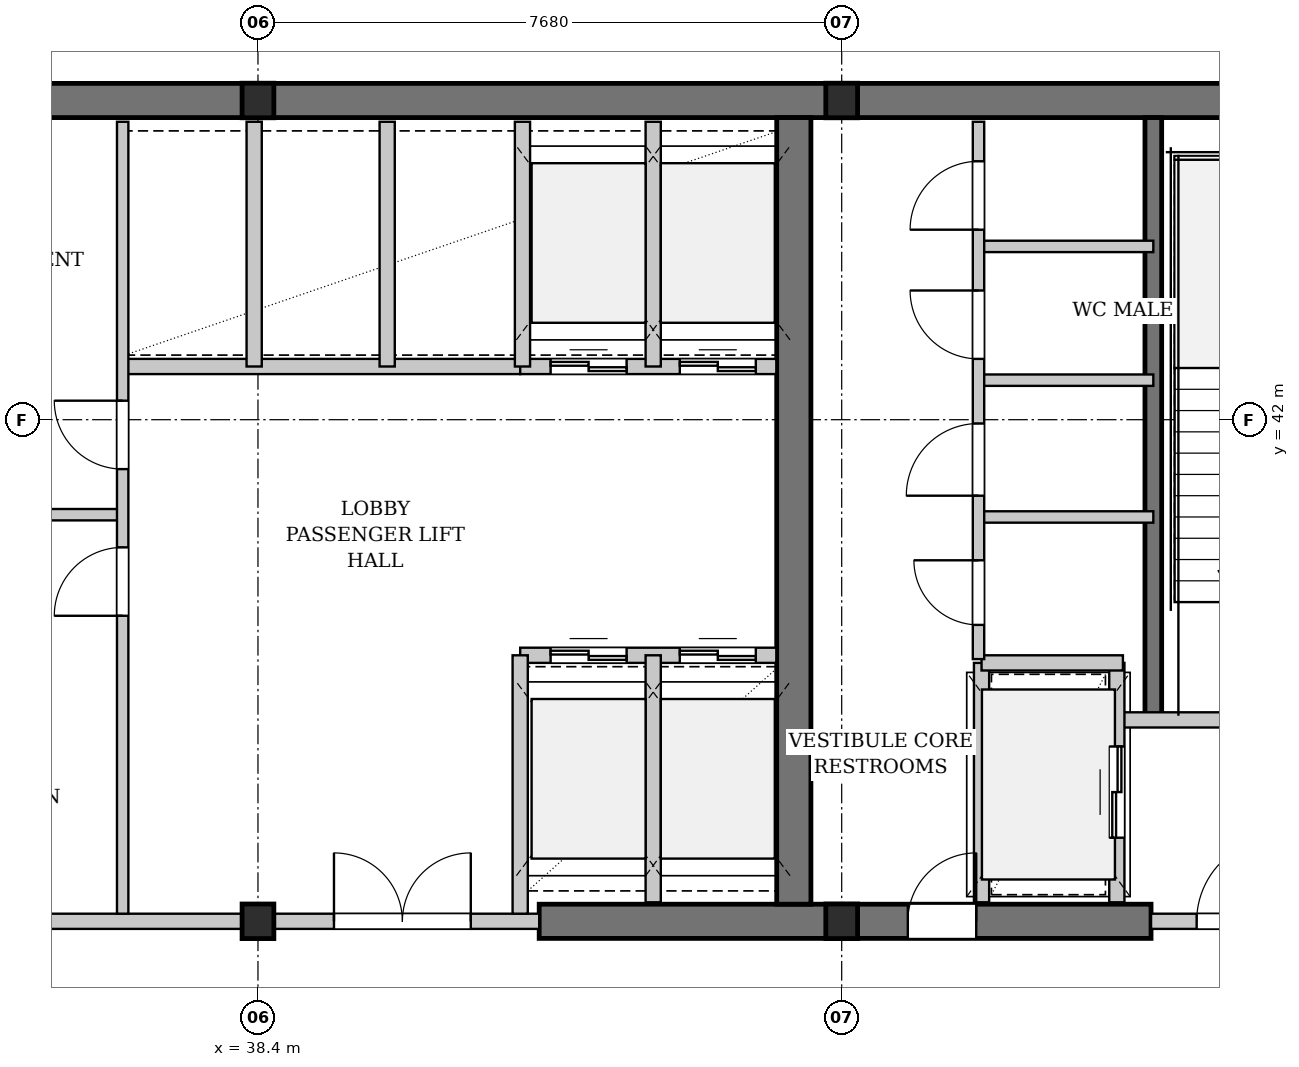
"""IFC4 building model, lengths in metres.
Left out: names, types, materials, properties, quantities, classifications, styles, units other than length and angle.
Written with IfcOpenShell. Run it as: python <this file> out.ifc"""

import sys

from ifc_helpers import new_model, si_unit, direction, frame, frame_2d, origin, origin_2d, place, context, subcontext, project, spatial, rectangle, i_section, extrude, element, fill, save


model = new_model("IFC4")
c1 = context("Model", 3, precision=1e-05, world=origin(), true_north=direction((0.0, 1.0)))
c2 = subcontext(c1, "Body", "Model", "MODEL_VIEW")
j1 = project(units=[si_unit("LENGTHUNIT", "METRE"), si_unit("PLANEANGLEUNIT", "RADIAN")], contexts=[c1])
p1 = place(None, origin())
s1 = spatial("IfcSite", under=j1, at=p1, CompositionType="ELEMENT")
p2 = place(p1, origin())
s2 = spatial("IfcBuilding", under=s1, at=p2, CompositionType="ELEMENT")
p3 = place(p2, frame((0.0, 0.0, 196.1)))
s3 = spatial("IfcBuildingStorey", under=s2, at=p3, CompositionType="ELEMENT", Elevation=196.1)
p4 = place(p3, frame((22.815, 46.2, 0.0), z_axis=(0.0, 0.0, 1.0), x_axis=(1.0, 0.0, 0.0)))
e1 = element("IfcWall", 1, at=p4, inside=s3, PredefinedType="SHEAR", context=c2, shape_type="SweptSolid", body=[
    extrude(rectangle(XDim=31.17, YDim=0.45, at=frame_2d((15.585, 0.0))), origin(), (0.0, 0.0, 1.0), 3.78),
])
p5 = place(p3, frame((42.1, 35.4, 0.0), z_axis=(0.0, 0.0, 1.0), x_axis=(1.0, 0.0, 0.0)))
e2 = element("IfcWall", 2, at=p5, inside=s3, PredefinedType="SHEAR", context=c2, shape_type="SweptSolid", body=[
    extrude(rectangle(XDim=8.05, YDim=0.45, at=frame_2d((4.025, 0.0))), origin(), (0.0, 0.0, 1.0), 3.78),
])
p6 = place(p5, frame((4.85, 0.0, 0.0)))
e3 = element("IfcOpeningElement", 3, at=p6, cuts=e2, PredefinedType="OPENING", context=c2, shape_type="SweptSolid", body=[
    extrude(rectangle(XDim=0.9, YDim=2.15, at=frame_2d((0.45, 1.075))), frame((0.0, 0.235, 0.0), z_axis=(0.0, -1.0, 0.0), x_axis=(1.0, 0.0, 0.0)), (0.0, 0.0, 1.0), 0.47),
])
p7 = place(p3, frame((45.45, 35.625, 0.0), z_axis=(0.0, 0.0, 1.0), x_axis=(0.0, 1.0, 0.0)))
e4 = element("IfcWall", 4, at=p7, inside=s3, PredefinedType="SHEAR", context=c2, shape_type="SweptSolid", body=[
    extrude(rectangle(XDim=10.35, YDim=0.45, at=frame_2d((5.175, 0.0))), origin(), (0.0, 0.0, 1.0), 3.78),
])
p8 = place(p3, frame((50.18, 38.05, 0.0), z_axis=(0.0, 0.0, 1.0), x_axis=(0.0, 1.0, 0.0)))
e5 = element("IfcWall", 5, at=p8, inside=s3, PredefinedType="SHEAR", context=c2, shape_type="SweptSolid", body=[
    extrude(rectangle(XDim=7.925, YDim=0.22, at=frame_2d((3.962, 0.0))), origin(), (0.0, 0.0, 1.0), 3.78),
])
for number, where, z_axis, x_axis in (
    (6, (38.4, 35.4, 0.0), (0.0, 0.0, 1.0), (1.0, 0.0, 0.0)),
    (7, (38.4, 46.2, 0.0), (0.0, 0.0, 1.0), (1.0, 0.0, 0.0)),
    (8, (46.08, 35.4, 0.0), (0.0, 0.0, 1.0), (1.0, 0.0, 0.0)),
    (9, (46.08, 46.2, 0.0), (0.0, 0.0, 1.0), (1.0, 0.0, 0.0)),
):
    element("IfcColumn", number, at=place(p3, frame(where, z_axis=z_axis, x_axis=x_axis)), inside=s3, PredefinedType="COLUMN", context=c2, shape_type="SweptSolid", body=[
        extrude(i_section(OverallWidth=0.418, OverallDepth=0.455, WebThickness=0.042, FlangeThickness=0.068, FilletRadius=0.015, at=origin_2d()), origin(), (0.0, 0.0, 1.0), 4.2),
    ])
p9 = place(p3, frame((35.6, 35.4, 0.0), z_axis=(0.0, 0.0, 1.0), x_axis=(1.0, 0.0, 0.0)))
e10 = element("IfcWall", 10, at=p9, inside=s3, PredefinedType="PARTITIONING", context=c2, shape_type="SweptSolid", body=[
    extrude(rectangle(XDim=6.5, YDim=0.2, at=frame_2d((3.25, 0.0))), origin(), (0.0, 0.0, 1.0), 2.961),
])
p10 = place(p9, frame((3.8, 0.0, 0.0)))
e11 = element("IfcOpeningElement", 11, at=p10, cuts=e10, PredefinedType="OPENING", context=c2, shape_type="SweptSolid", body=[
    extrude(rectangle(XDim=1.8, YDim=2.3, at=frame_2d((0.9, 1.15))), frame((0.0, 0.11, 0.0), z_axis=(0.0, -1.0, 0.0), x_axis=(1.0, 0.0, 0.0)), (0.0, 0.0, 1.0), 0.22),
])
p11 = place(p3, frame((36.6, 42.7, 0.0), z_axis=(0.0, 0.0, 1.0), x_axis=(1.0, 0.0, 0.0)))
e12 = element("IfcWall", 12, at=p11, inside=s3, PredefinedType="PARTITIONING", context=c2, shape_type="SweptSolid", body=[
    extrude(rectangle(XDim=5.25, YDim=0.2, at=frame_2d((2.625, 0.0))), origin(), (0.0, 0.0, 1.0), 3.78),
])
p12 = place(p3, frame((38.35, 42.7, 0.0), z_axis=(0.0, 0.0, 1.0), x_axis=(0.0, 1.0, 0.0)))
e13 = element("IfcWall", 13, at=p12, inside=s3, PredefinedType="PARTITIONING", context=c2, shape_type="SweptSolid", body=[
    extrude(rectangle(XDim=3.22, YDim=0.2, at=frame_2d((1.61, 0.0))), origin(), (0.0, 0.0, 1.0), 2.961),
])
p13 = place(p3, frame((40.1, 42.7, 0.0), z_axis=(0.0, 0.0, 1.0), x_axis=(0.0, 1.0, 0.0)))
e14 = element("IfcWall", 14, at=p13, inside=s3, PredefinedType="PARTITIONING", context=c2, shape_type="SweptSolid", body=[
    extrude(rectangle(XDim=3.22, YDim=0.2, at=frame_2d((1.61, 0.0))), origin(), (0.0, 0.0, 1.0), 3.78),
])
p14 = place(p3, frame((33.05, 40.75, 0.0), z_axis=(0.0, 0.0, 1.0), x_axis=(1.0, 0.0, 0.0)))
e15 = element("IfcWall", 15, at=p14, inside=s3, PredefinedType="PARTITIONING", context=c2, shape_type="SweptSolid", body=[
    extrude(rectangle(XDim=3.57, YDim=0.15, at=frame_2d((1.785, 0.0))), origin(), (0.0, 0.0, 1.0), 3.78),
])
p15 = place(p3, frame((36.62, 35.5, 0.0), z_axis=(0.0, 0.0, 1.0), x_axis=(0.0, 1.0, 0.0)))
e16 = element("IfcWall", 16, at=p15, inside=s3, PredefinedType="PARTITIONING", context=c2, shape_type="SweptSolid", body=[
    extrude(rectangle(XDim=10.42, YDim=0.15, at=frame_2d((5.21, 0.0))), origin(), (0.0, 0.0, 1.0), 3.78),
])
p16 = place(p15, frame((3.92, 0.0, 0.0)))
e17 = element("IfcOpeningElement", 17, at=p16, cuts=e16, PredefinedType="OPENING", context=c2, shape_type="SweptSolid", body=[
    extrude(rectangle(XDim=0.9, YDim=2.15, at=frame_2d((0.45, 1.075))), frame((0.0, 0.085, 0.0), z_axis=(0.0, -1.0, 0.0), x_axis=(1.0, 0.0, 0.0)), (0.0, 0.0, 1.0), 0.17),
])
p17 = place(p15, frame((5.85, 0.0, 0.0)))
e18 = element("IfcOpeningElement", 18, at=p17, cuts=e16, PredefinedType="OPENING", context=c2, shape_type="SweptSolid", body=[
    extrude(rectangle(XDim=0.9, YDim=2.15, at=frame_2d((0.45, 1.075))), frame((0.0, 0.085, 0.0), z_axis=(0.0, -1.0, 0.0), x_axis=(1.0, 0.0, 0.0)), (0.0, 0.0, 1.0), 0.17),
])
p18 = place(p3, frame((41.85, 38.9, 0.0), z_axis=(0.0, 0.0, 1.0), x_axis=(1.0, 0.0, 0.0)))
e19 = element("IfcWall", 19, at=p18, inside=s3, PredefinedType="PARTITIONING", context=c2, shape_type="SweptSolid", body=[
    extrude(rectangle(XDim=3.37, YDim=0.2, at=frame_2d((1.685, 0.0))), origin(), (0.0, 0.0, 1.0), 3.78),
])
p19 = place(p18, frame((0.4, 0.0, 0.0)))
e20 = element("IfcOpeningElement", 20, at=p19, cuts=e19, PredefinedType="OPENING", context=c2, shape_type="SweptSolid", body=[
    extrude(rectangle(XDim=1.0, YDim=2.2, at=frame_2d((0.5, 1.1))), frame((0.0, 0.11, 0.0), z_axis=(0.0, -1.0, 0.0), x_axis=(1.0, 0.0, 0.0)), (0.0, 0.0, 1.0), 0.22),
])
p20 = place(p18, frame((2.1, 0.0, 0.0)))
e21 = element("IfcOpeningElement", 21, at=p20, cuts=e19, PredefinedType="OPENING", context=c2, shape_type="SweptSolid", body=[
    extrude(rectangle(XDim=1.0, YDim=2.2, at=frame_2d((0.5, 1.1))), frame((0.0, 0.11, 0.0), z_axis=(0.0, -1.0, 0.0), x_axis=(1.0, 0.0, 0.0)), (0.0, 0.0, 1.0), 0.22),
])
p21 = place(p3, frame((41.85, 42.7, 0.0), z_axis=(0.0, 0.0, 1.0), x_axis=(1.0, 0.0, 0.0)))
e22 = element("IfcWall", 22, at=p21, inside=s3, PredefinedType="PARTITIONING", context=c2, shape_type="SweptSolid", body=[
    extrude(rectangle(XDim=3.37, YDim=0.2, at=frame_2d((1.685, 0.0))), origin(), (0.0, 0.0, 1.0), 3.78),
])
p22 = place(p21, frame((0.4, 0.0, 0.0)))
e23 = element("IfcOpeningElement", 23, at=p22, cuts=e22, PredefinedType="OPENING", context=c2, shape_type="SweptSolid", body=[
    extrude(rectangle(XDim=1.0, YDim=2.2, at=frame_2d((0.5, 1.1))), frame((0.0, 0.11, 0.0), z_axis=(0.0, -1.0, 0.0), x_axis=(1.0, 0.0, 0.0)), (0.0, 0.0, 1.0), 0.22),
])
p23 = place(p21, frame((2.1, 0.0, 0.0)))
e24 = element("IfcOpeningElement", 24, at=p23, cuts=e22, PredefinedType="OPENING", context=c2, shape_type="SweptSolid", body=[
    extrude(rectangle(XDim=1.0, YDim=2.2, at=frame_2d((0.5, 1.1))), frame((0.0, 0.11, 0.0), z_axis=(0.0, -1.0, 0.0), x_axis=(1.0, 0.0, 0.0)), (0.0, 0.0, 1.0), 0.22),
])
p24 = place(p3, frame((43.6, 35.65, 0.0), z_axis=(0.0, 0.0, 1.0), x_axis=(0.0, 1.0, 0.0)))
e25 = element("IfcWall", 25, at=p24, inside=s3, PredefinedType="PARTITIONING", context=c2, shape_type="SweptSolid", body=[
    extrude(rectangle(XDim=3.25, YDim=0.2, at=frame_2d((1.625, 0.0))), origin(), (0.0, 0.0, 1.0), 3.78),
])
p25 = place(p3, frame((43.6, 42.7, 0.0), z_axis=(0.0, 0.0, 1.0), x_axis=(0.0, 1.0, 0.0)))
e26 = element("IfcWall", 26, at=p25, inside=s3, PredefinedType="PARTITIONING", context=c2, shape_type="SweptSolid", body=[
    extrude(rectangle(XDim=3.22, YDim=0.2, at=frame_2d((1.61, 0.0))), origin(), (0.0, 0.0, 1.0), 3.78),
])
p26 = place(p3, frame((41.85, 35.5, 0.0), z_axis=(0.0, 0.0, 1.0), x_axis=(0.0, 1.0, 0.0)))
e27 = element("IfcWall", 27, at=p26, inside=s3, PredefinedType="PARTITIONING", context=c2, shape_type="SweptSolid", body=[
    extrude(rectangle(XDim=3.4, YDim=0.2, at=frame_2d((1.7, 0.0))), origin(), (0.0, 0.0, 1.0), 3.78),
])
p27 = place(p3, frame((41.88, 42.7, 0.0), z_axis=(0.0, 0.0, 1.0), x_axis=(0.0, 1.0, 0.0)))
e28 = element("IfcWall", 28, at=p27, inside=s3, PredefinedType="PARTITIONING", context=c2, shape_type="SweptSolid", body=[
    extrude(rectangle(XDim=3.22, YDim=0.2, at=frame_2d((1.61, 0.0))), origin(), (0.0, 0.0, 1.0), 3.78),
])
p28 = place(p3, frame((49.78, 38.05, 0.0), z_axis=(0.0, 0.0, 1.0), x_axis=(1.0, 0.0, 0.0)))
e29 = element("IfcWall", 29, at=p28, inside=s3, PredefinedType="PARTITIONING", context=c2, shape_type="SweptSolid", body=[
    extrude(rectangle(XDim=3.72, YDim=0.2, at=frame_2d((1.86, 0.0))), origin(), (0.0, 0.0, 1.0), 3.78),
])
p29 = place(p28, frame((1.436, 0.0, 0.0)))
e30 = element("IfcOpeningElement", 30, at=p29, cuts=e29, PredefinedType="OPENING", context=c2, shape_type="SweptSolid", body=[
    extrude(rectangle(XDim=1.1, YDim=2.15, at=frame_2d((0.55, 1.075))), frame((0.0, 0.11, 0.0), z_axis=(0.0, -1.0, 0.0), x_axis=(1.0, 0.0, 0.0)), (0.0, 0.0, 1.0), 0.22),
])
p30 = place(p3, frame((50.15, 35.4, 0.0), z_axis=(0.0, 0.0, 1.0), x_axis=(1.0, 0.0, 0.0)))
e31 = element("IfcWall", 31, at=p30, inside=s3, PredefinedType="PARTITIONING", context=c2, shape_type="SweptSolid", body=[
    extrude(rectangle(XDim=2.3, YDim=0.2, at=frame_2d((1.15, 0.0))), origin(), (0.0, 0.0, 1.0), 2.961),
])
p31 = place(p30, frame((0.6, 0.0, 0.0)))
e32 = element("IfcOpeningElement", 32, at=p31, cuts=e31, PredefinedType="OPENING", context=c2, shape_type="SweptSolid", body=[
    extrude(rectangle(XDim=1.1, YDim=2.15, at=frame_2d((0.55, 1.075))), frame((0.0, 0.11, 0.0), z_axis=(0.0, -1.0, 0.0), x_axis=(1.0, 0.0, 0.0)), (0.0, 0.0, 1.0), 0.22),
])
p32 = place(p3, frame((49.7, 35.65, 0.0), z_axis=(0.0, 0.0, 1.0), x_axis=(0.0, 1.0, 0.0)))
e33 = element("IfcWall", 33, at=p32, inside=s3, PredefinedType="PARTITIONING", context=c2, shape_type="SweptSolid", body=[
    extrude(rectangle(XDim=3.15, YDim=0.2, at=frame_2d((1.575, 0.0))), origin(), (0.0, 0.0, 1.0), 3.78),
])
p33 = place(p32, frame((0.85, 0.0, 0.0)))
e34 = element("IfcOpeningElement", 34, at=p33, cuts=e33, PredefinedType="OPENING", context=c2, shape_type="SweptSolid", body=[
    extrude(rectangle(XDim=1.2, YDim=2.2, at=frame_2d((0.6, 1.1))), frame((0.0, 0.11, 0.0), z_axis=(0.0, -1.0, 0.0), x_axis=(1.0, 0.0, 0.0)), (0.0, 0.0, 1.0), 0.22),
])
p34 = place(p3, frame((47.92, 35.65, 0.0), z_axis=(0.0, 0.0, 1.0), x_axis=(0.0, 1.0, 0.0)))
e35 = element("IfcWall", 35, at=p34, inside=s3, PredefinedType="PARTITIONING", context=c2, shape_type="SweptSolid", body=[
    extrude(rectangle(XDim=3.15, YDim=0.2, at=frame_2d((1.575, 0.0))), origin(), (0.0, 0.0, 1.0), 3.78),
])
p35 = place(p3, frame((47.92, 38.8, 0.0), z_axis=(0.0, 0.0, 1.0), x_axis=(1.0, 0.0, 0.0)))
e36 = element("IfcWall", 36, at=p35, inside=s3, PredefinedType="PARTITIONING", context=c2, shape_type="SweptSolid", body=[
    extrude(rectangle(XDim=1.86, YDim=0.2, at=frame_2d((0.93, 0.0))), origin(), (0.0, 0.0, 1.0), 3.78),
])
for number, where, z_axis, x_axis in (
    (37, (47.88, 40.72, 0.0), (0.0, 0.0, 1.0), (1.0, 0.0, 0.0)),
    (38, (47.88, 42.52, 0.0), (0.0, 0.0, 1.0), (1.0, 0.0, 0.0)),
    (39, (47.88, 44.28, 0.0), (0.0, 0.0, 1.0), (1.0, 0.0, 0.0)),
):
    element("IfcWall", number, at=place(p3, frame(where, z_axis=z_axis, x_axis=x_axis)), inside=s3, PredefinedType="PARTITIONING", context=c2, shape_type="SweptSolid", body=[
        extrude(rectangle(XDim=2.3, YDim=0.15, at=frame_2d((1.15, 0.0))), origin(), (0.0, 0.0, 1.0), 3.78),
    ])
p36 = place(p3, frame((47.88, 38.85, 0.0), z_axis=(0.0, 0.0, 1.0), x_axis=(0.0, 1.0, 0.0)))
e40 = element("IfcWall", 40, at=p36, inside=s3, PredefinedType="PARTITIONING", context=c2, shape_type="SweptSolid", body=[
    extrude(rectangle(XDim=7.07, YDim=0.15, at=frame_2d((3.535, 0.0))), origin(), (0.0, 0.0, 1.0), 3.78),
])
p37 = place(p36, frame((0.45, 0.0, 0.0)))
e41 = element("IfcOpeningElement", 41, at=p37, cuts=e40, PredefinedType="OPENING", context=c2, shape_type="SweptSolid", body=[
    extrude(rectangle(XDim=0.85, YDim=2.15, at=frame_2d((0.425, 1.075))), frame((0.0, 0.085, 0.0), z_axis=(0.0, -1.0, 0.0), x_axis=(1.0, 0.0, 0.0)), (0.0, 0.0, 1.0), 0.17),
])
p38 = place(p36, frame((2.15, 0.0, 0.0)))
e42 = element("IfcOpeningElement", 42, at=p38, cuts=e40, PredefinedType="OPENING", context=c2, shape_type="SweptSolid", body=[
    extrude(rectangle(XDim=0.95, YDim=2.15, at=frame_2d((0.475, 1.075))), frame((0.0, 0.085, 0.0), z_axis=(0.0, -1.0, 0.0), x_axis=(1.0, 0.0, 0.0)), (0.0, 0.0, 1.0), 0.17),
])
p39 = place(p36, frame((3.95, 0.0, 0.0)))
e43 = element("IfcOpeningElement", 43, at=p39, cuts=e40, PredefinedType="OPENING", context=c2, shape_type="SweptSolid", body=[
    extrude(rectangle(XDim=0.9, YDim=2.15, at=frame_2d((0.45, 1.075))), frame((0.0, 0.085, 0.0), z_axis=(0.0, -1.0, 0.0), x_axis=(1.0, 0.0, 0.0)), (0.0, 0.0, 1.0), 0.17),
])
p40 = place(p36, frame((5.65, 0.0, 0.0)))
e44 = element("IfcOpeningElement", 44, at=p40, cuts=e40, PredefinedType="OPENING", context=c2, shape_type="SweptSolid", body=[
    extrude(rectangle(XDim=0.9, YDim=2.15, at=frame_2d((0.45, 1.075))), frame((0.0, 0.085, 0.0), z_axis=(0.0, -1.0, 0.0), x_axis=(1.0, 0.0, 0.0)), (0.0, 0.0, 1.0), 0.17),
])
p41 = place(p10, origin())
e45 = element("IfcDoor", 45, at=p41, inside=s3, OperationType="DOUBLE_DOOR_SINGLE_SWING", PredefinedType="DOOR", context=c2, shape_type="SweptSolid", body=[
    extrude(rectangle(XDim=1.8, YDim=2.3, at=frame_2d((0.9, 1.15))), frame((0.0, 0.025, 0.0), z_axis=(0.0, -1.0, 0.0), x_axis=(1.0, 0.0, 0.0)), (0.0, 0.0, 1.0), 0.05),
])
fill(e11, e45)
p42 = place(p16, origin())
e46 = element("IfcDoor", 46, at=p42, inside=s3, OperationType="SINGLE_SWING_LEFT", PredefinedType="DOOR", context=c2, shape_type="SweptSolid", body=[
    extrude(rectangle(XDim=0.9, YDim=2.15, at=frame_2d((0.45, 1.075))), frame((0.0, 0.025, 0.0), z_axis=(0.0, -1.0, 0.0), x_axis=(1.0, 0.0, 0.0)), (0.0, 0.0, 1.0), 0.05),
])
fill(e17, e46)
p43 = place(p17, origin())
e47 = element("IfcDoor", 47, at=p43, inside=s3, OperationType="SINGLE_SWING_RIGHT", PredefinedType="DOOR", context=c2, shape_type="SweptSolid", body=[
    extrude(rectangle(XDim=0.9, YDim=2.15, at=frame_2d((0.45, 1.075))), frame((0.0, 0.025, 0.0), z_axis=(0.0, -1.0, 0.0), x_axis=(1.0, 0.0, 0.0)), (0.0, 0.0, 1.0), 0.05),
])
fill(e18, e47)
p44 = place(p19, origin())
e48 = element("IfcDoor", 48, at=p44, inside=s3, OperationType="DOUBLE_DOOR_SLIDING", PredefinedType="DOOR", context=c2, shape_type="SweptSolid", body=[
    extrude(rectangle(XDim=1.0, YDim=2.2, at=frame_2d((0.5, 1.1))), frame((0.0, 0.025, 0.0), z_axis=(0.0, -1.0, 0.0), x_axis=(1.0, 0.0, 0.0)), (0.0, 0.0, 1.0), 0.05),
])
fill(e20, e48)
p45 = place(p20, origin())
e49 = element("IfcDoor", 49, at=p45, inside=s3, OperationType="DOUBLE_DOOR_SLIDING", PredefinedType="DOOR", context=c2, shape_type="SweptSolid", body=[
    extrude(rectangle(XDim=1.0, YDim=2.2, at=frame_2d((0.5, 1.1))), frame((0.0, 0.025, 0.0), z_axis=(0.0, -1.0, 0.0), x_axis=(1.0, 0.0, 0.0)), (0.0, 0.0, 1.0), 0.05),
])
fill(e21, e49)
p46 = place(p22, origin())
e50 = element("IfcDoor", 50, at=p46, inside=s3, OperationType="DOUBLE_DOOR_SLIDING", PredefinedType="DOOR", context=c2, shape_type="SweptSolid", body=[
    extrude(rectangle(XDim=1.0, YDim=2.2, at=frame_2d((0.5, 1.1))), frame((0.0, 0.025, 0.0), z_axis=(0.0, -1.0, 0.0), x_axis=(1.0, 0.0, 0.0)), (0.0, 0.0, 1.0), 0.05),
])
fill(e23, e50)
p47 = place(p23, origin())
e51 = element("IfcDoor", 51, at=p47, inside=s3, OperationType="DOUBLE_DOOR_SLIDING", PredefinedType="DOOR", context=c2, shape_type="SweptSolid", body=[
    extrude(rectangle(XDim=1.0, YDim=2.2, at=frame_2d((0.5, 1.1))), frame((0.0, 0.025, 0.0), z_axis=(0.0, -1.0, 0.0), x_axis=(1.0, 0.0, 0.0)), (0.0, 0.0, 1.0), 0.05),
])
fill(e24, e51)
p48 = place(p31, origin())
e52 = element("IfcDoor", 52, at=p48, inside=s3, OperationType="SINGLE_SWING_RIGHT", PredefinedType="DOOR", context=c2, shape_type="SweptSolid", body=[
    extrude(rectangle(XDim=1.1, YDim=2.15, at=frame_2d((0.55, 1.075))), frame((0.0, 0.025, 0.0), z_axis=(0.0, -1.0, 0.0), x_axis=(1.0, 0.0, 0.0)), (0.0, 0.0, 1.0), 0.05),
])
fill(e32, e52)
p49 = place(p33, origin())
e53 = element("IfcDoor", 53, at=p49, inside=s3, OperationType="DOUBLE_DOOR_SLIDING", PredefinedType="DOOR", context=c2, shape_type="SweptSolid", body=[
    extrude(rectangle(XDim=1.2, YDim=2.2, at=frame_2d((0.6, 1.1))), frame((0.0, 0.025, 0.0), z_axis=(0.0, -1.0, 0.0), x_axis=(1.0, 0.0, 0.0)), (0.0, 0.0, 1.0), 0.05),
])
fill(e34, e53)
p50 = place(p37, origin())
e54 = element("IfcDoor", 54, at=p50, inside=s3, OperationType="SINGLE_SWING_RIGHT", PredefinedType="DOOR", context=c2, shape_type="SweptSolid", body=[
    extrude(rectangle(XDim=0.85, YDim=2.15, at=frame_2d((0.425, 1.075))), frame((0.0, 0.025, 0.0), z_axis=(0.0, -1.0, 0.0), x_axis=(1.0, 0.0, 0.0)), (0.0, 0.0, 1.0), 0.05),
])
fill(e41, e54)
p51 = place(p38, origin())
e55 = element("IfcDoor", 55, at=p51, inside=s3, OperationType="SINGLE_SWING_LEFT", PredefinedType="DOOR", context=c2, shape_type="SweptSolid", body=[
    extrude(rectangle(XDim=0.95, YDim=2.15, at=frame_2d((0.475, 1.075))), frame((0.0, 0.025, 0.0), z_axis=(0.0, -1.0, 0.0), x_axis=(1.0, 0.0, 0.0)), (0.0, 0.0, 1.0), 0.05),
])
fill(e42, e55)
p52 = place(p39, origin())
e56 = element("IfcDoor", 56, at=p52, inside=s3, OperationType="SINGLE_SWING_RIGHT", PredefinedType="DOOR", context=c2, shape_type="SweptSolid", body=[
    extrude(rectangle(XDim=0.9, YDim=2.15, at=frame_2d((0.45, 1.075))), frame((0.0, 0.025, 0.0), z_axis=(0.0, -1.0, 0.0), x_axis=(1.0, 0.0, 0.0)), (0.0, 0.0, 1.0), 0.05),
])
fill(e43, e56)
p53 = place(p40, origin())
e57 = element("IfcDoor", 57, at=p53, inside=s3, OperationType="SINGLE_SWING_LEFT", PredefinedType="DOOR", context=c2, shape_type="SweptSolid", body=[
    extrude(rectangle(XDim=0.9, YDim=2.15, at=frame_2d((0.45, 1.075))), frame((0.0, 0.025, 0.0), z_axis=(0.0, -1.0, 0.0), x_axis=(1.0, 0.0, 0.0)), (0.0, 0.0, 1.0), 0.05),
])
fill(e44, e57)
p54 = place(p6, origin())
e58 = element("IfcDoor", 58, at=p54, inside=s3, OperationType="SINGLE_SWING_RIGHT", PredefinedType="DOOR", context=c2, shape_type="SweptSolid", body=[
    extrude(rectangle(XDim=0.9, YDim=2.15, at=frame_2d((0.45, 1.075))), frame((0.0, 0.025, 0.0), z_axis=(0.0, -1.0, 0.0), x_axis=(1.0, 0.0, 0.0)), (0.0, 0.0, 1.0), 0.05),
])
fill(e3, e58)
save(model, sys.argv[1])
